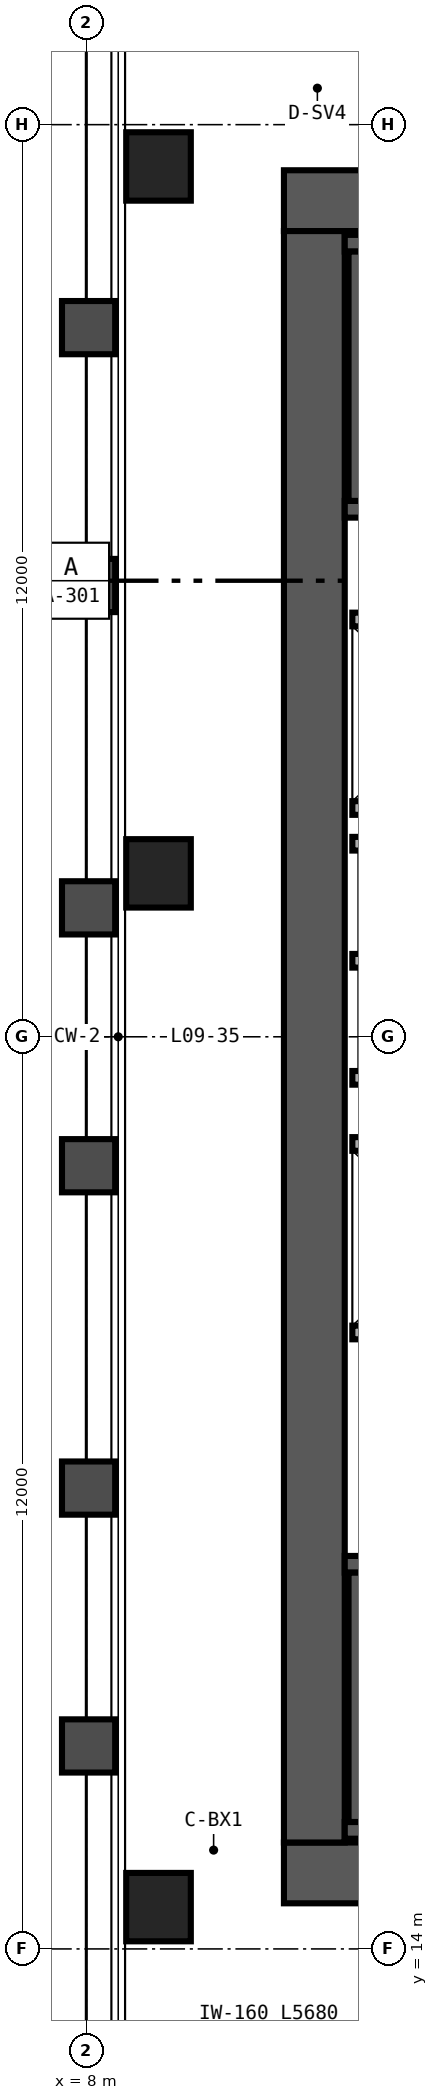
"""IFC4 building model, lengths in metres.
Left out: names, types, materials, properties, quantities, classifications, styles, units other than length and angle.
Written with IfcOpenShell. Run it as: python <this file> out.ifc"""

import sys

from ifc_helpers import new_model, si_unit, direction, frame, frame_2d, origin, origin_2d, place, context, subcontext, project, spatial, rectangle, hollow_rectangle, extrude, source, transform, mapped, element, save


model = new_model("IFC4")
c1 = context("Model", 3, precision=1e-05, world=origin(), true_north=direction((0.0, 1.0)))
c2 = subcontext(c1, "Body", "Model", "MODEL_VIEW")
j1 = project(units=[si_unit("LENGTHUNIT", "METRE"), si_unit("PLANEANGLEUNIT", "RADIAN")], contexts=[c1])
p1 = place(None, origin())
s1 = spatial("IfcSite", under=j1, at=p1, CompositionType="ELEMENT")
p2 = place(p1, origin())
s2 = spatial("IfcBuilding", under=s1, at=p2, CompositionType="ELEMENT")
p3 = place(p2, frame((0.0, 0.0, 42.0)))
s3 = spatial("IfcBuildingStorey", under=s2, at=p3, CompositionType="ELEMENT", Elevation=42.0)
p4 = place(p3, frame((10.6, 15.0, 0.0), z_axis=(0.0, 0.0, 1.0), x_axis=(1.0, 0.0, 0.0)))
e1 = element("IfcWall", 1, at=p4, inside=s3, PredefinedType="SHEAR", context=c2, shape_type="SweptSolid", body=[
    extrude(rectangle(XDim=12.8, YDim=0.8, at=frame_2d((6.4, 0.0))), origin(), (0.0, 0.0, 1.0), 3.35),
])
p5 = place(p4, frame((8.98, 0.0, 0.0)))
e2 = element("IfcOpeningElement", 2, at=p5, cuts=e1, PredefinedType="OPENING", context=c2, shape_type="SweptSolid", body=[
    extrude(rectangle(XDim=1.0, YDim=2.15, at=frame_2d((0.5, 1.075))), frame((0.0, 0.41, 0.0), z_axis=(0.0, -1.0, 0.0), x_axis=(1.0, 0.0, 0.0)), (0.0, 0.0, 1.0), 0.82),
])
p6 = place(p3, frame((10.6, 37.0, 0.0), z_axis=(0.0, 0.0, 1.0), x_axis=(1.0, 0.0, 0.0)))
e3 = element("IfcWall", 3, at=p6, inside=s3, PredefinedType="SHEAR", context=c2, shape_type="SweptSolid", body=[
    extrude(rectangle(XDim=12.8, YDim=0.8, at=frame_2d((6.4, 0.0))), origin(), (0.0, 0.0, 1.0), 3.35),
])
p7 = place(p6, frame((8.98, 0.0, 0.0)))
e4 = element("IfcOpeningElement", 4, at=p7, cuts=e3, PredefinedType="OPENING", context=c2, shape_type="SweptSolid", body=[
    extrude(rectangle(XDim=1.0, YDim=2.15, at=frame_2d((0.5, 1.075))), frame((0.0, 0.41, 0.0), z_axis=(0.0, -1.0, 0.0), x_axis=(1.0, 0.0, 0.0)), (0.0, 0.0, 1.0), 0.82),
])
p8 = place(p3, frame((11.0, 15.4, 0.0), z_axis=(0.0, 0.0, 1.0), x_axis=(0.0, 1.0, 0.0)))
e5 = element("IfcWall", 5, at=p8, inside=s3, PredefinedType="SHEAR", context=c2, shape_type="SweptSolid", body=[
    extrude(rectangle(XDim=21.2, YDim=0.8, at=frame_2d((10.6, 0.0))), origin(), (0.0, 0.0, 1.0), 3.35),
])
p9 = place(p3, frame((11.4, 15.56, 0.0), z_axis=(0.0, 0.0, 1.0), x_axis=(1.0, 0.0, 0.0)))
e6 = element("IfcWall", 6, at=p9, inside=s3, PredefinedType="SHEAR", context=c2, shape_type="SweptSolid", body=[
    extrude(rectangle(XDim=7.91, YDim=0.22, at=frame_2d((3.955, 0.0))), origin(), (0.0, 0.0, 1.0), 3.4),
])
p10 = place(p3, frame((11.4, 19.06, 0.0), z_axis=(0.0, 0.0, 1.0), x_axis=(1.0, 0.0, 0.0)))
e7 = element("IfcWall", 7, at=p10, inside=s3, PredefinedType="SHEAR", context=c2, shape_type="SweptSolid", body=[
    extrude(rectangle(XDim=7.91, YDim=0.22, at=frame_2d((3.955, 0.0))), origin(), (0.0, 0.0, 1.0), 3.4),
])
p11 = place(p10, frame((0.52, 0.0, 0.0)))
e8 = element("IfcOpeningElement", 8, at=p11, cuts=e7, PredefinedType="OPENING", context=c2, shape_type="SweptSolid", body=[
    extrude(rectangle(XDim=1.05, YDim=2.15, at=frame_2d((0.525, 1.075))), frame((0.0, 0.12, 0.0), z_axis=(0.0, -1.0, 0.0), x_axis=(1.0, 0.0, 0.0)), (0.0, 0.0, 1.0), 0.24),
])
p12 = place(p3, frame((11.56, 15.67, 0.0), z_axis=(0.0, 0.0, 1.0), x_axis=(0.0, 1.0, 0.0)))
e9 = element("IfcWall", 9, at=p12, inside=s3, PredefinedType="SHEAR", context=c2, shape_type="SweptSolid", body=[
    extrude(rectangle(XDim=3.28, YDim=0.22, at=frame_2d((1.64, 0.0))), origin(), (0.0, 0.0, 1.0), 3.4),
])
p13 = place(p3, frame((11.4, 32.94, 0.0), z_axis=(0.0, 0.0, 1.0), x_axis=(1.0, 0.0, 0.0)))
e10 = element("IfcWall", 10, at=p13, inside=s3, PredefinedType="SHEAR", context=c2, shape_type="SweptSolid", body=[
    extrude(rectangle(XDim=7.91, YDim=0.22, at=frame_2d((3.955, 0.0))), origin(), (0.0, 0.0, 1.0), 3.4),
])
p14 = place(p13, frame((0.52, 0.0, 0.0)))
e11 = element("IfcOpeningElement", 11, at=p14, cuts=e10, PredefinedType="OPENING", context=c2, shape_type="SweptSolid", body=[
    extrude(rectangle(XDim=1.05, YDim=2.15, at=frame_2d((0.525, 1.075))), frame((0.0, 0.12, 0.0), z_axis=(0.0, -1.0, 0.0), x_axis=(1.0, 0.0, 0.0)), (0.0, 0.0, 1.0), 0.24),
])
p15 = place(p3, frame((11.4, 36.44, 0.0), z_axis=(0.0, 0.0, 1.0), x_axis=(1.0, 0.0, 0.0)))
e12 = element("IfcWall", 12, at=p15, inside=s3, PredefinedType="SHEAR", context=c2, shape_type="SweptSolid", body=[
    extrude(rectangle(XDim=7.91, YDim=0.22, at=frame_2d((3.955, 0.0))), origin(), (0.0, 0.0, 1.0), 3.4),
])
p16 = place(p3, frame((11.56, 33.05, 0.0), z_axis=(0.0, 0.0, 1.0), x_axis=(0.0, 1.0, 0.0)))
e13 = element("IfcWall", 13, at=p16, inside=s3, PredefinedType="SHEAR", context=c2, shape_type="SweptSolid", body=[
    extrude(rectangle(XDim=3.28, YDim=0.22, at=frame_2d((1.64, 0.0))), origin(), (0.0, 0.0, 1.0), 3.4),
])
m1 = source(origin(), c2, "Body", "SweptSolid", [
    extrude(hollow_rectangle(XDim=0.85, YDim=0.9, WallThickness=0.04, at=origin_2d()), origin(), (0.0, 0.0, 1.0), 3.35),
])
for number, where, z_axis, x_axis in (
    (14, (8.95, 14.55, 0.0), (0.0, 0.0, 1.0), (1.0, 0.0, 0.0)),
    (15, (8.95, 28.15, 0.0), (0.0, 0.0, 1.0), (1.0, 0.0, 0.0)),
    (16, (8.95, 37.45, 0.0), (0.0, 0.0, 1.0), (1.0, 0.0, 0.0)),
):
    element("IfcColumn", number, at=place(p3, frame(where, z_axis=z_axis, x_axis=x_axis)), inside=s3, PredefinedType="COLUMN", context=c2, shape_type="MappedRepresentation", body=[
        mapped(m1, transform((0.0, 0.0, 0.0), scale=1.0)),
    ])
for number, where, z_axis, x_axis in (
    (17, (11.5, 22.11, 0.0), (0.0, 0.0, 1.0), (1.0, 0.0, 0.0)),
    (18, (11.5, 24.59, 0.0), (0.0, 0.0, 1.0), (1.0, 0.0, 0.0)),
    (19, (11.5, 29.01, 0.0), (0.0, 0.0, 1.0), (1.0, 0.0, 0.0)),
    (20, (11.5, 31.49, 0.0), (0.0, 0.0, 1.0), (1.0, 0.0, 0.0)),
):
    element("IfcWall", number, at=place(p3, frame(where, z_axis=z_axis, x_axis=x_axis)), inside=s3, PredefinedType="SOLIDWALL", context=c2, shape_type="SweptSolid", body=[
        extrude(rectangle(XDim=2.5, YDim=0.18, at=frame_2d((1.25, 0.0))), origin(), (0.0, 0.0, 1.0), 3.35),
    ])
for number, where, z_axis, x_axis in (
    (21, (11.5, 25.46, 0.0), (0.0, 0.0, 1.0), (1.0, 0.0, 0.0)),
    (22, (11.5, 27.0, 0.0), (0.0, 0.0, 1.0), (1.0, 0.0, 0.0)),
    (23, (11.5, 28.54, 0.0), (0.0, 0.0, 1.0), (1.0, 0.0, 0.0)),
):
    element("IfcWall", number, at=place(p3, frame(where, z_axis=z_axis, x_axis=x_axis)), inside=s3, PredefinedType="SOLIDWALL", context=c2, shape_type="SweptSolid", body=[
        extrude(rectangle(XDim=2.51, YDim=0.18, at=frame_2d((1.255, 0.0))), origin(), (0.0, 0.0, 1.0), 3.35),
    ])
save(model, sys.argv[1])
